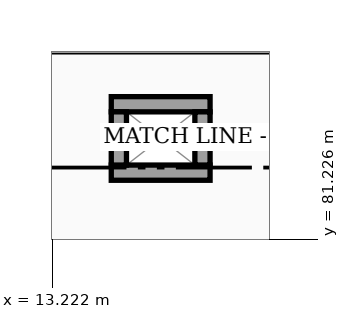
"""IFC4 building model, lengths in metres.
Left out: names, types, materials, properties, quantities, classifications, styles, units other than length and angle.
Written with IfcOpenShell. Run it as: python <this file> out.ifc"""

import sys

from ifc_helpers import new_model, si_unit, direction, frame, frame_2d, origin, place, context, subcontext, project, spatial, rectangle, extrude, element, save


model = new_model("IFC4")
c1 = context("Model", 3, precision=1e-05, world=origin(), true_north=direction((0.0, 1.0)))
c2 = subcontext(c1, "Body", "Model", "MODEL_VIEW")
j1 = project(units=[si_unit("LENGTHUNIT", "METRE"), si_unit("PLANEANGLEUNIT", "RADIAN")], contexts=[c1])
p1 = place(None, origin())
s1 = spatial("IfcSite", under=j1, at=p1, CompositionType="ELEMENT")
p2 = place(p1, origin())
s2 = spatial("IfcBuilding", under=s1, at=p2, CompositionType="ELEMENT")
p3 = place(p2, frame((0.0, 0.0, 4.5)))
s3 = spatial("IfcBuildingStorey", under=s2, at=p3, CompositionType="ELEMENT", Elevation=4.5)
for number, where, z_axis, x_axis in (
    (1, (15.3, 82.1, 0.0), (0.0, 0.0, 1.0), (-1.0, 0.0, 0.0)),
    (2, (14.0, 83.0, 0.0), (0.0, 0.0, 1.0), (1.0, 0.0, 0.0)),
):
    element("IfcWall", number, at=place(p3, frame(where, z_axis=z_axis, x_axis=x_axis)), inside=s3, PredefinedType="PARTITIONING", context=c2, shape_type="SweptSolid", body=[
        extrude(rectangle(XDim=1.3, YDim=0.2, at=frame_2d((0.65, 0.0))), origin(), (0.0, 0.0, 1.0), 3.65),
    ])
for number, where, z_axis, x_axis in (
    (3, (14.1, 82.2, 0.0), (0.0, 0.0, 1.0), (0.0, 1.0, 0.0)),
    (4, (15.2, 82.9, 0.0), (0.0, 0.0, 1.0), (0.0, -1.0, 0.0)),
):
    element("IfcWall", number, at=place(p3, frame(where, z_axis=z_axis, x_axis=x_axis)), inside=s3, PredefinedType="PARTITIONING", context=c2, shape_type="SweptSolid", body=[
        extrude(rectangle(XDim=0.7, YDim=0.2, at=frame_2d((0.35, 0.0))), origin(), (0.0, 0.0, 1.0), 3.65),
    ])
save(model, sys.argv[1])
